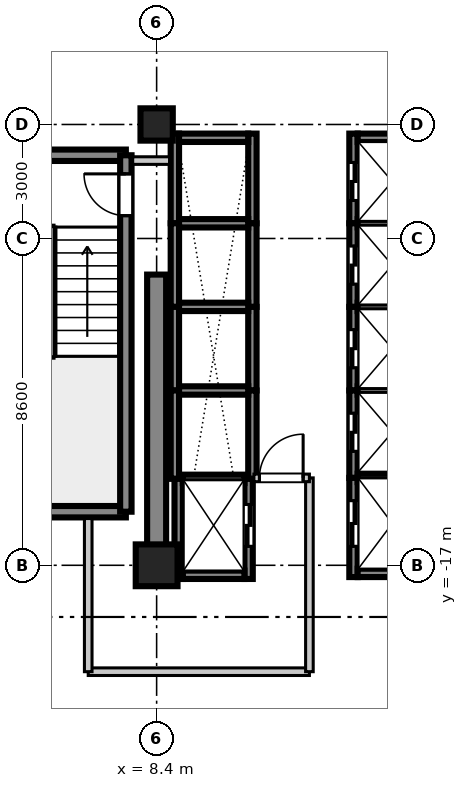
"""IFC4 building model, lengths in metres.
Left out: names, types, materials, properties, quantities, classifications, styles, units other than length and angle.
Written with IfcOpenShell. Run it as: python <this file> out.ifc"""

import sys

from ifc_helpers import new_model, si_unit, direction, frame, frame_2d, origin, origin_2d, place, context, subcontext, project, spatial, rectangle, extrude, source, transform, mapped, element, fill, save


model = new_model("IFC4")
c1 = context("Model", 3, precision=1e-05, world=origin(), true_north=direction((0.0, 1.0)))
c2 = subcontext(c1, "Body", "Model", "MODEL_VIEW")
j1 = project(units=[si_unit("LENGTHUNIT", "METRE"), si_unit("PLANEANGLEUNIT", "RADIAN")], contexts=[c1])
p1 = place(None, origin())
s1 = spatial("IfcSite", under=j1, at=p1, CompositionType="ELEMENT")
p2 = place(p1, origin())
s2 = spatial("IfcBuilding", under=s1, at=p2, CompositionType="ELEMENT")
p3 = place(p2, frame((0.0, 0.0, 178.2)))
s3 = spatial("IfcBuildingStorey", under=s2, at=p3, CompositionType="ELEMENT", Elevation=178.2)
m1 = source(origin(), c2, "Body", "SweptSolid", [
    extrude(rectangle(XDim=1.1, YDim=1.1, at=origin_2d()), origin(), (0.0, 0.0, 1.0), 3.605),
])
p4 = place(p3, frame((8.4, -17.0, 0.0), z_axis=(0.0, 0.0, 1.0), x_axis=(1.0, 0.0, 0.0)))
e1 = element("IfcColumn", 1, at=p4, inside=s3, PredefinedType="COLUMN", context=c2, shape_type="MappedRepresentation", body=[
    mapped(m1, transform((0.0, 0.0, 0.0), scale=1.0)),
])
m2 = source(origin(), c2, "Body", "SweptSolid", [
    extrude(rectangle(XDim=0.85, YDim=0.85, at=origin_2d()), origin(), (0.0, 0.0, 1.0), 3.605),
])
p5 = place(p3, frame((8.4, -5.4, 0.0), z_axis=(0.0, 0.0, 1.0), x_axis=(1.0, 0.0, 0.0)))
e2 = element("IfcColumn", 2, at=p5, inside=s3, PredefinedType="PILASTER", context=c2, shape_type="MappedRepresentation", body=[
    mapped(m2, transform((0.0, 0.0, 0.0), scale=1.0)),
])
m3 = source(origin(), c2, "Body", "SweptSolid", [
    extrude(rectangle(XDim=7.65, YDim=0.5, at=frame_2d((3.825, 0.0))), origin(), (0.0, 0.0, 1.0), 3.39),
])
p6 = place(p3, frame((8.4, -17.0, 0.0), z_axis=(0.0, 0.0, 1.0), x_axis=(0.0, 1.0, 0.0)))
e3 = element("IfcWall", 3, at=p6, inside=s3, PredefinedType="SHEAR", context=c2, shape_type="MappedRepresentation", body=[
    mapped(m3, transform((0.0, 0.0, 0.0), scale=1.0)),
])
m4 = source(origin(), c2, "Body", "SweptSolid", [
    extrude(rectangle(XDim=3.98, YDim=0.3, at=frame_2d((1.99, 0.0))), origin(), (0.0, 0.0, 1.0), 3.39),
])
for number, where, z_axis, x_axis in (
    (4, (3.61, -15.59, 0.0), (0.0, 0.0, 1.0), (1.0, 0.0, 0.0)),
    (5, (3.61, -6.21, 0.0), (0.0, 0.0, 1.0), (1.0, 0.0, 0.0)),
):
    element("IfcWall", number, at=place(p3, frame(where, z_axis=z_axis, x_axis=x_axis)), inside=s3, PredefinedType="SHEAR", context=c2, shape_type="MappedRepresentation", body=[
        mapped(m4, transform((0.0, 0.0, 0.0), scale=1.0)),
    ])
m5 = source(origin(), c2, "Body", "SweptSolid", [
    extrude(rectangle(XDim=9.38, YDim=0.3, at=frame_2d((4.69, 0.0))), origin(), (0.0, 0.0, 1.0), 3.39),
])
p7 = place(p3, frame((7.59, -15.59, 0.0), z_axis=(0.0, 0.0, 1.0), x_axis=(0.0, 1.0, 0.0)))
e6 = element("IfcWall", 6, at=p7, inside=s3, PredefinedType="SHEAR", context=c2, shape_type="MappedRepresentation", body=[
    mapped(m5, transform((0.0, 0.0, 0.0), scale=1.0)),
])
p8 = place(p7, frame((7.79, 0.0, 0.0)))
e7 = element("IfcOpeningElement", 7, at=p8, cuts=e6, PredefinedType="OPENING", context=c2, shape_type="SweptSolid", body=[
    extrude(rectangle(XDim=1.1, YDim=2.15, at=frame_2d((0.55, 1.075))), frame((0.0, 0.16, 0.0), z_axis=(0.0, -1.0, 0.0), x_axis=(1.0, 0.0, 0.0)), (0.0, 0.0, 1.0), 0.32),
])
m6 = source(origin(), c2, "Body", "SweptSolid", [
    extrude(rectangle(XDim=2.36, YDim=0.22, at=frame_2d((1.18, 0.0))), origin(), (0.0, 0.0, 1.0), 3.39),
])
p9 = place(p3, frame((13.58, -8.0, 0.0), z_axis=(0.0, 0.0, 1.0), x_axis=(0.0, 1.0, 0.0)))
e8 = element("IfcWall", 8, at=p9, inside=s3, PredefinedType="SHEAR", context=c2, shape_type="MappedRepresentation", body=[
    mapped(m6, transform((0.0, 0.0, 0.0), scale=1.0)),
])
p10 = place(p9, frame((0.6, 0.0, 0.0)))
e9 = element("IfcOpeningElement", 9, at=p10, cuts=e8, PredefinedType="OPENING", context=c2, shape_type="SweptSolid", body=[
    extrude(rectangle(XDim=1.0, YDim=2.2, at=frame_2d((0.5, 1.1))), frame((0.0, 0.12, 0.0), z_axis=(0.0, -1.0, 0.0), x_axis=(1.0, 0.0, 0.0)), (0.0, 0.0, 1.0), 0.24),
])
m7 = source(origin(), c2, "Body", "SweptSolid", [
    extrude(rectangle(XDim=1.82, YDim=0.22, at=frame_2d((0.91, 0.0))), origin(), (0.0, 0.0, 1.0), 3.39),
])
p11 = place(p3, frame((13.69, -5.75, 0.0), z_axis=(0.0, 0.0, 1.0), x_axis=(1.0, 0.0, 0.0)))
e10 = element("IfcWall", 10, at=p11, inside=s3, PredefinedType="SHEAR", context=c2, shape_type="MappedRepresentation", body=[
    mapped(m7, transform((0.0, 0.0, 0.0), scale=1.0)),
])
m8 = source(origin(), c2, "Body", "SweptSolid", [
    extrude(rectangle(XDim=2.2, YDim=0.22, at=frame_2d((1.1, 0.0))), origin(), (0.0, 0.0, 1.0), 3.39),
])
p12 = place(p3, frame((13.58, -10.2, 0.0), z_axis=(0.0, 0.0, 1.0), x_axis=(0.0, 1.0, 0.0)))
e11 = element("IfcWall", 11, at=p12, inside=s3, PredefinedType="SHEAR", context=c2, shape_type="MappedRepresentation", body=[
    mapped(m8, transform((0.0, 0.0, 0.0), scale=1.0)),
])
p13 = place(p12, frame((0.6, 0.0, 0.0)))
e12 = element("IfcOpeningElement", 12, at=p13, cuts=e11, PredefinedType="OPENING", context=c2, shape_type="SweptSolid", body=[
    extrude(rectangle(XDim=1.0, YDim=2.2, at=frame_2d((0.5, 1.1))), frame((0.0, 0.12, 0.0), z_axis=(0.0, -1.0, 0.0), x_axis=(1.0, 0.0, 0.0)), (0.0, 0.0, 1.0), 0.24),
])
m9 = source(origin(), c2, "Body", "SweptSolid", [
    extrude(rectangle(XDim=1.82, YDim=0.22, at=frame_2d((0.91, 0.0))), origin(), (0.0, 0.0, 1.0), 3.65),
])
p14 = place(p3, frame((13.69, -8.0, 0.0), z_axis=(0.0, 0.0, 1.0), x_axis=(1.0, 0.0, 0.0)))
e13 = element("IfcWall", 13, at=p14, inside=s3, PredefinedType="SHEAR", context=c2, shape_type="MappedRepresentation", body=[
    mapped(m9, transform((0.0, 0.0, 0.0), scale=1.0)),
])
p15 = place(p3, frame((13.58, -12.4, 0.0), z_axis=(0.0, 0.0, 1.0), x_axis=(0.0, 1.0, 0.0)))
e14 = element("IfcWall", 14, at=p15, inside=s3, PredefinedType="SHEAR", context=c2, shape_type="MappedRepresentation", body=[
    mapped(m8, transform((0.0, 0.0, 0.0), scale=1.0)),
])
p16 = place(p15, frame((0.6, 0.0, 0.0)))
e15 = element("IfcOpeningElement", 15, at=p16, cuts=e14, PredefinedType="OPENING", context=c2, shape_type="SweptSolid", body=[
    extrude(rectangle(XDim=1.0, YDim=2.2, at=frame_2d((0.5, 1.1))), frame((0.0, 0.12, 0.0), z_axis=(0.0, -1.0, 0.0), x_axis=(1.0, 0.0, 0.0)), (0.0, 0.0, 1.0), 0.24),
])
p17 = place(p3, frame((13.69, -10.2, 0.0), z_axis=(0.0, 0.0, 1.0), x_axis=(1.0, 0.0, 0.0)))
e16 = element("IfcWall", 16, at=p17, inside=s3, PredefinedType="SHEAR", context=c2, shape_type="MappedRepresentation", body=[
    mapped(m9, transform((0.0, 0.0, 0.0), scale=1.0)),
])
m10 = source(origin(), c2, "Body", "SweptSolid", [
    extrude(rectangle(XDim=2.3, YDim=0.22, at=frame_2d((1.15, 0.0))), origin(), (0.0, 0.0, 1.0), 3.39),
])
p18 = place(p3, frame((13.58, -14.7, 0.0), z_axis=(0.0, 0.0, 1.0), x_axis=(0.0, 1.0, 0.0)))
e17 = element("IfcWall", 17, at=p18, inside=s3, PredefinedType="SHEAR", context=c2, shape_type="MappedRepresentation", body=[
    mapped(m10, transform((0.0, 0.0, 0.0), scale=1.0)),
])
p19 = place(p18, frame((0.7, 0.0, 0.0)))
e18 = element("IfcOpeningElement", 18, at=p19, cuts=e17, PredefinedType="OPENING", context=c2, shape_type="SweptSolid", body=[
    extrude(rectangle(XDim=1.0, YDim=2.2, at=frame_2d((0.5, 1.1))), frame((0.0, 0.12, 0.0), z_axis=(0.0, -1.0, 0.0), x_axis=(1.0, 0.0, 0.0)), (0.0, 0.0, 1.0), 0.24),
])
p20 = place(p3, frame((13.69, -12.4, 0.0), z_axis=(0.0, 0.0, 1.0), x_axis=(1.0, 0.0, 0.0)))
e19 = element("IfcWall", 19, at=p20, inside=s3, PredefinedType="SHEAR", context=c2, shape_type="MappedRepresentation", body=[
    mapped(m9, transform((0.0, 0.0, 0.0), scale=1.0)),
])
for number, where, z_axis, x_axis in (
    (20, (8.88, -8.0, 0.0), (0.0, 0.0, 1.0), (0.0, 1.0, 0.0)),
    (21, (10.92, -8.0, 0.0), (0.0, 0.0, 1.0), (0.0, 1.0, 0.0)),
):
    element("IfcWall", number, at=place(p3, frame(where, z_axis=z_axis, x_axis=x_axis)), inside=s3, PredefinedType="SHEAR", context=c2, shape_type="MappedRepresentation", body=[
        mapped(m6, transform((0.0, 0.0, 0.0), scale=1.0)),
    ])
p21 = place(p3, frame((8.99, -5.75, 0.0), z_axis=(0.0, 0.0, 1.0), x_axis=(1.0, 0.0, 0.0)))
e22 = element("IfcWall", 22, at=p21, inside=s3, PredefinedType="SHEAR", context=c2, shape_type="MappedRepresentation", body=[
    mapped(m7, transform((0.0, 0.0, 0.0), scale=1.0)),
])
for number, where, z_axis, x_axis in (
    (23, (8.88, -10.2, 0.0), (0.0, 0.0, 1.0), (0.0, 1.0, 0.0)),
    (24, (10.92, -10.2, 0.0), (0.0, 0.0, 1.0), (0.0, 1.0, 0.0)),
):
    element("IfcWall", number, at=place(p3, frame(where, z_axis=z_axis, x_axis=x_axis)), inside=s3, PredefinedType="SHEAR", context=c2, shape_type="MappedRepresentation", body=[
        mapped(m8, transform((0.0, 0.0, 0.0), scale=1.0)),
    ])
p22 = place(p3, frame((8.99, -8.0, 0.0), z_axis=(0.0, 0.0, 1.0), x_axis=(1.0, 0.0, 0.0)))
e25 = element("IfcWall", 25, at=p22, inside=s3, PredefinedType="SHEAR", context=c2, shape_type="MappedRepresentation", body=[
    mapped(m9, transform((0.0, 0.0, 0.0), scale=1.0)),
])
for number, where, z_axis, x_axis in (
    (26, (8.88, -12.4, 0.0), (0.0, 0.0, 1.0), (0.0, 1.0, 0.0)),
    (27, (10.92, -12.4, 0.0), (0.0, 0.0, 1.0), (0.0, 1.0, 0.0)),
):
    element("IfcWall", number, at=place(p3, frame(where, z_axis=z_axis, x_axis=x_axis)), inside=s3, PredefinedType="SHEAR", context=c2, shape_type="MappedRepresentation", body=[
        mapped(m8, transform((0.0, 0.0, 0.0), scale=1.0)),
    ])
p23 = place(p3, frame((8.99, -10.2, 0.0), z_axis=(0.0, 0.0, 1.0), x_axis=(1.0, 0.0, 0.0)))
e28 = element("IfcWall", 28, at=p23, inside=s3, PredefinedType="SHEAR", context=c2, shape_type="MappedRepresentation", body=[
    mapped(m9, transform((0.0, 0.0, 0.0), scale=1.0)),
])
m11 = source(origin(), c2, "Body", "SweptSolid", [
    extrude(rectangle(XDim=2.325, YDim=0.22, at=frame_2d((1.163, 0.0))), origin(), (0.0, 0.0, 1.0), 3.39),
])
for number, where, z_axis, x_axis in (
    (29, (8.88, -14.725, 0.0), (0.0, 0.0, 1.0), (0.0, 1.0, 0.0)),
    (30, (10.92, -14.725, 0.0), (0.0, 0.0, 1.0), (0.0, 1.0, 0.0)),
):
    element("IfcWall", number, at=place(p3, frame(where, z_axis=z_axis, x_axis=x_axis)), inside=s3, PredefinedType="SHEAR", context=c2, shape_type="MappedRepresentation", body=[
        mapped(m11, transform((0.0, 0.0, 0.0), scale=1.0)),
    ])
p24 = place(p3, frame((8.99, -12.4, 0.0), z_axis=(0.0, 0.0, 1.0), x_axis=(1.0, 0.0, 0.0)))
e31 = element("IfcWall", 31, at=p24, inside=s3, PredefinedType="SHEAR", context=c2, shape_type="MappedRepresentation", body=[
    mapped(m9, transform((0.0, 0.0, 0.0), scale=1.0)),
])
m12 = source(origin(), c2, "Body", "SweptSolid", [
    extrude(rectangle(XDim=2.635, YDim=0.22, at=frame_2d((1.317, 0.0))), origin(), (0.0, 0.0, 1.0), 3.39),
])
p25 = place(p3, frame((8.98, -17.36, 0.0), z_axis=(0.0, 0.0, 1.0), x_axis=(0.0, 1.0, 0.0)))
e32 = element("IfcWall", 32, at=p25, inside=s3, PredefinedType="SHEAR", context=c2, shape_type="MappedRepresentation", body=[
    mapped(m12, transform((0.0, 0.0, 0.0), scale=1.0)),
])
p26 = place(p3, frame((10.82, -17.36, 0.0), z_axis=(0.0, 0.0, 1.0), x_axis=(0.0, 1.0, 0.0)))
e33 = element("IfcWall", 33, at=p26, inside=s3, PredefinedType="SHEAR", context=c2, shape_type="MappedRepresentation", body=[
    mapped(m12, transform((0.0, 0.0, 0.0), scale=1.0)),
])
p27 = place(p26, frame((0.86, 0.0, 0.0)))
e34 = element("IfcOpeningElement", 34, at=p27, cuts=e33, PredefinedType="OPENING", context=c2, shape_type="SweptSolid", body=[
    extrude(rectangle(XDim=1.1, YDim=2.2, at=frame_2d((0.55, 1.1))), frame((0.0, 0.12, 0.0), z_axis=(0.0, -1.0, 0.0), x_axis=(1.0, 0.0, 0.0)), (0.0, 0.0, 1.0), 0.24),
])
m13 = source(origin(), c2, "Body", "SweptSolid", [
    extrude(rectangle(XDim=1.62, YDim=0.22, at=frame_2d((0.81, 0.0))), origin(), (0.0, 0.0, 1.0), 3.39),
])
p28 = place(p3, frame((9.09, -17.25, 0.0), z_axis=(0.0, 0.0, 1.0), x_axis=(1.0, 0.0, 0.0)))
e35 = element("IfcWall", 35, at=p28, inside=s3, PredefinedType="SHEAR", context=c2, shape_type="MappedRepresentation", body=[
    mapped(m13, transform((0.0, 0.0, 0.0), scale=1.0)),
])
m14 = source(origin(), c2, "Body", "SweptSolid", [
    extrude(rectangle(XDim=1.62, YDim=0.22, at=frame_2d((0.81, 0.0))), origin(), (0.0, 0.0, 1.0), 3.65),
])
p29 = place(p3, frame((9.09, -14.725, 0.0), z_axis=(0.0, 0.0, 1.0), x_axis=(1.0, 0.0, 0.0)))
e36 = element("IfcWall", 36, at=p29, inside=s3, PredefinedType="SHEAR", context=c2, shape_type="MappedRepresentation", body=[
    mapped(m14, transform((0.0, 0.0, 0.0), scale=1.0)),
])
m15 = source(origin(), c2, "Body", "SweptSolid", [
    extrude(rectangle(XDim=2.61, YDim=0.22, at=frame_2d((1.305, 0.0))), origin(), (0.0, 0.0, 1.0), 3.39),
])
p30 = place(p3, frame((13.58, -17.31, 0.0), z_axis=(0.0, 0.0, 1.0), x_axis=(0.0, 1.0, 0.0)))
e37 = element("IfcWall", 37, at=p30, inside=s3, PredefinedType="SHEAR", context=c2, shape_type="MappedRepresentation", body=[
    mapped(m15, transform((0.0, 0.0, 0.0), scale=1.0)),
])
p31 = place(p30, frame((0.81, 0.0, 0.0)))
e38 = element("IfcOpeningElement", 38, at=p31, cuts=e37, PredefinedType="OPENING", context=c2, shape_type="SweptSolid", body=[
    extrude(rectangle(XDim=1.2, YDim=2.2, at=frame_2d((0.6, 1.1))), frame((0.0, 0.12, 0.0), z_axis=(0.0, -1.0, 0.0), x_axis=(1.0, 0.0, 0.0)), (0.0, 0.0, 1.0), 0.24),
])
p32 = place(p3, frame((13.69, -17.2, 0.0), z_axis=(0.0, 0.0, 1.0), x_axis=(1.0, 0.0, 0.0)))
e39 = element("IfcWall", 39, at=p32, inside=s3, PredefinedType="SHEAR", context=c2, shape_type="MappedRepresentation", body=[
    mapped(m7, transform((0.0, 0.0, 0.0), scale=1.0)),
])
p33 = place(p3, frame((13.69, -14.7, 0.0), z_axis=(0.0, 0.0, 1.0), x_axis=(1.0, 0.0, 0.0)))
e40 = element("IfcWall", 40, at=p33, inside=s3, PredefinedType="SHEAR", context=c2, shape_type="MappedRepresentation", body=[
    mapped(m9, transform((0.0, 0.0, 0.0), scale=1.0)),
])
m16 = source(origin(), c2, "Body", "SweptSolid", [
    extrude(rectangle(XDim=5.82, YDim=0.2, at=frame_2d((2.91, 0.0))), origin(), (0.0, 0.0, 1.0), 2.73),
])
p34 = place(p3, frame((6.6, -19.8, 0.0), z_axis=(0.0, 0.0, 1.0), x_axis=(1.0, 0.0, 0.0)))
e41 = element("IfcWall", 41, at=p34, inside=s3, PredefinedType="PARTITIONING", context=c2, shape_type="MappedRepresentation", body=[
    mapped(m16, transform((0.0, 0.0, 0.0), scale=1.0)),
])
m17 = source(origin(), c2, "Body", "SweptSolid", [
    extrude(rectangle(XDim=4.03, YDim=0.2, at=frame_2d((2.015, 0.0))), origin(), (0.0, 0.0, 1.0), 2.73),
])
p35 = place(p3, frame((6.6, -19.8, 0.0), z_axis=(0.0, 0.0, 1.0), x_axis=(0.0, 1.0, 0.0)))
e42 = element("IfcWall", 42, at=p35, inside=s3, PredefinedType="PARTITIONING", context=c2, shape_type="MappedRepresentation", body=[
    mapped(m17, transform((0.0, 0.0, 0.0), scale=1.0)),
])
m18 = source(origin(), c2, "Body", "SweptSolid", [
    extrude(rectangle(XDim=5.1, YDim=0.2, at=frame_2d((2.55, 0.0))), origin(), (0.0, 0.0, 1.0), 2.73),
])
p36 = place(p3, frame((12.42, -19.8, 0.0), z_axis=(0.0, 0.0, 1.0), x_axis=(0.0, 1.0, 0.0)))
e43 = element("IfcWall", 43, at=p36, inside=s3, PredefinedType="PARTITIONING", context=c2, shape_type="MappedRepresentation", body=[
    mapped(m18, transform((0.0, 0.0, 0.0), scale=1.0)),
])
m19 = source(origin(), c2, "Body", "SweptSolid", [
    extrude(rectangle(XDim=1.46, YDim=0.2, at=frame_2d((0.73, 0.0))), origin(), (0.0, 0.0, 1.0), 2.73),
])
p37 = place(p3, frame((10.96, -14.7, 0.0), z_axis=(0.0, 0.0, 1.0), x_axis=(1.0, 0.0, 0.0)))
e44 = element("IfcWall", 44, at=p37, inside=s3, PredefinedType="PARTITIONING", context=c2, shape_type="MappedRepresentation", body=[
    mapped(m19, transform((0.0, 0.0, 0.0), scale=1.0)),
])
p38 = place(p37, frame((0.145, 0.0, 0.0)))
e45 = element("IfcOpeningElement", 45, at=p38, cuts=e44, PredefinedType="OPENING", context=c2, shape_type="SweptSolid", body=[
    extrude(rectangle(XDim=1.15, YDim=2.15, at=frame_2d((0.575, 1.075))), frame((0.0, 0.11, 0.0), z_axis=(0.0, -1.0, 0.0), x_axis=(1.0, 0.0, 0.0)), (0.0, 0.0, 1.0), 0.22),
])
m20 = source(origin(), c2, "Body", "SweptSolid", [
    extrude(rectangle(XDim=0.97, YDim=0.2, at=frame_2d((0.485, 0.0))), origin(), (0.0, 0.0, 1.0), 2.73),
])
p39 = place(p3, frame((7.77, -6.35, 0.0), z_axis=(0.0, 0.0, 1.0), x_axis=(1.0, 0.0, 0.0)))
e46 = element("IfcWall", 46, at=p39, inside=s3, PredefinedType="PARTITIONING", context=c2, shape_type="MappedRepresentation", body=[
    mapped(m20, transform((0.0, 0.0, 0.0), scale=1.0)),
])
m21 = source(origin(), c2, "Body", "SweptSolid", [
    extrude(rectangle(XDim=1.1, YDim=2.15, at=frame_2d((0.55, 1.075))), frame((0.0, 0.025, 0.0), z_axis=(0.0, -1.0, 0.0), x_axis=(1.0, 0.0, 0.0)), (0.0, 0.0, 1.0), 0.05),
])
p40 = place(p8, origin())
e47 = element("IfcDoor", 47, at=p40, inside=s3, OperationType="SINGLE_SWING_RIGHT", PredefinedType="DOOR", context=c2, shape_type="MappedRepresentation", body=[
    mapped(m21, transform((0.0, 0.0, 0.0), scale=1.0)),
])
fill(e7, e47)
m22 = source(origin(), c2, "Body", "SweptSolid", [
    extrude(rectangle(XDim=1.0, YDim=2.2, at=frame_2d((0.5, 1.1))), frame((0.0, 0.025, 0.0), z_axis=(0.0, -1.0, 0.0), x_axis=(1.0, 0.0, 0.0)), (0.0, 0.0, 1.0), 0.05),
])
p41 = place(p10, origin())
e48 = element("IfcDoor", 48, at=p41, inside=s3, OperationType="DOUBLE_DOOR_SLIDING", PredefinedType="DOOR", context=c2, shape_type="MappedRepresentation", body=[
    mapped(m22, transform((0.0, 0.0, 0.0), scale=1.0)),
])
fill(e9, e48)
p42 = place(p13, origin())
e49 = element("IfcDoor", 49, at=p42, inside=s3, OperationType="DOUBLE_DOOR_SLIDING", PredefinedType="DOOR", context=c2, shape_type="MappedRepresentation", body=[
    mapped(m22, transform((0.0, 0.0, 0.0), scale=1.0)),
])
fill(e12, e49)
p43 = place(p16, origin())
e50 = element("IfcDoor", 50, at=p43, inside=s3, OperationType="DOUBLE_DOOR_SLIDING", PredefinedType="DOOR", context=c2, shape_type="MappedRepresentation", body=[
    mapped(m22, transform((0.0, 0.0, 0.0), scale=1.0)),
])
fill(e15, e50)
p44 = place(p19, origin())
e51 = element("IfcDoor", 51, at=p44, inside=s3, OperationType="DOUBLE_DOOR_SLIDING", PredefinedType="DOOR", context=c2, shape_type="MappedRepresentation", body=[
    mapped(m22, transform((0.0, 0.0, 0.0), scale=1.0)),
])
fill(e18, e51)
m23 = source(origin(), c2, "Body", "SweptSolid", [
    extrude(rectangle(XDim=1.1, YDim=2.2, at=frame_2d((0.55, 1.1))), frame((0.0, 0.025, 0.0), z_axis=(0.0, -1.0, 0.0), x_axis=(1.0, 0.0, 0.0)), (0.0, 0.0, 1.0), 0.05),
])
p45 = place(p27, frame((1.1, 0.0, 0.0), z_axis=(0.0, 0.0, 1.0), x_axis=(-1.0, 0.0, 0.0)))
e52 = element("IfcDoor", 52, at=p45, inside=s3, OperationType="DOUBLE_DOOR_SLIDING", PredefinedType="DOOR", context=c2, shape_type="MappedRepresentation", body=[
    mapped(m23, transform((0.0, 0.0, 0.0), scale=1.0)),
])
fill(e34, e52)
m24 = source(origin(), c2, "Body", "SweptSolid", [
    extrude(rectangle(XDim=1.2, YDim=2.2, at=frame_2d((0.6, 1.1))), frame((0.0, 0.025, 0.0), z_axis=(0.0, -1.0, 0.0), x_axis=(1.0, 0.0, 0.0)), (0.0, 0.0, 1.0), 0.05),
])
p46 = place(p31, origin())
e53 = element("IfcDoor", 53, at=p46, inside=s3, OperationType="DOUBLE_DOOR_SLIDING", PredefinedType="DOOR", context=c2, shape_type="MappedRepresentation", body=[
    mapped(m24, transform((0.0, 0.0, 0.0), scale=1.0)),
])
fill(e38, e53)
m25 = source(origin(), c2, "Body", "SweptSolid", [
    extrude(rectangle(XDim=1.15, YDim=2.15, at=frame_2d((0.575, 1.075))), frame((0.0, 0.025, 0.0), z_axis=(0.0, -1.0, 0.0), x_axis=(1.0, 0.0, 0.0)), (0.0, 0.0, 1.0), 0.05),
])
p47 = place(p38, origin())
e54 = element("IfcDoor", 54, at=p47, inside=s3, OperationType="SINGLE_SWING_RIGHT", PredefinedType="DOOR", context=c2, shape_type="MappedRepresentation", body=[
    mapped(m25, transform((0.0, 0.0, 0.0), scale=1.0)),
])
fill(e45, e54)
save(model, sys.argv[1])
